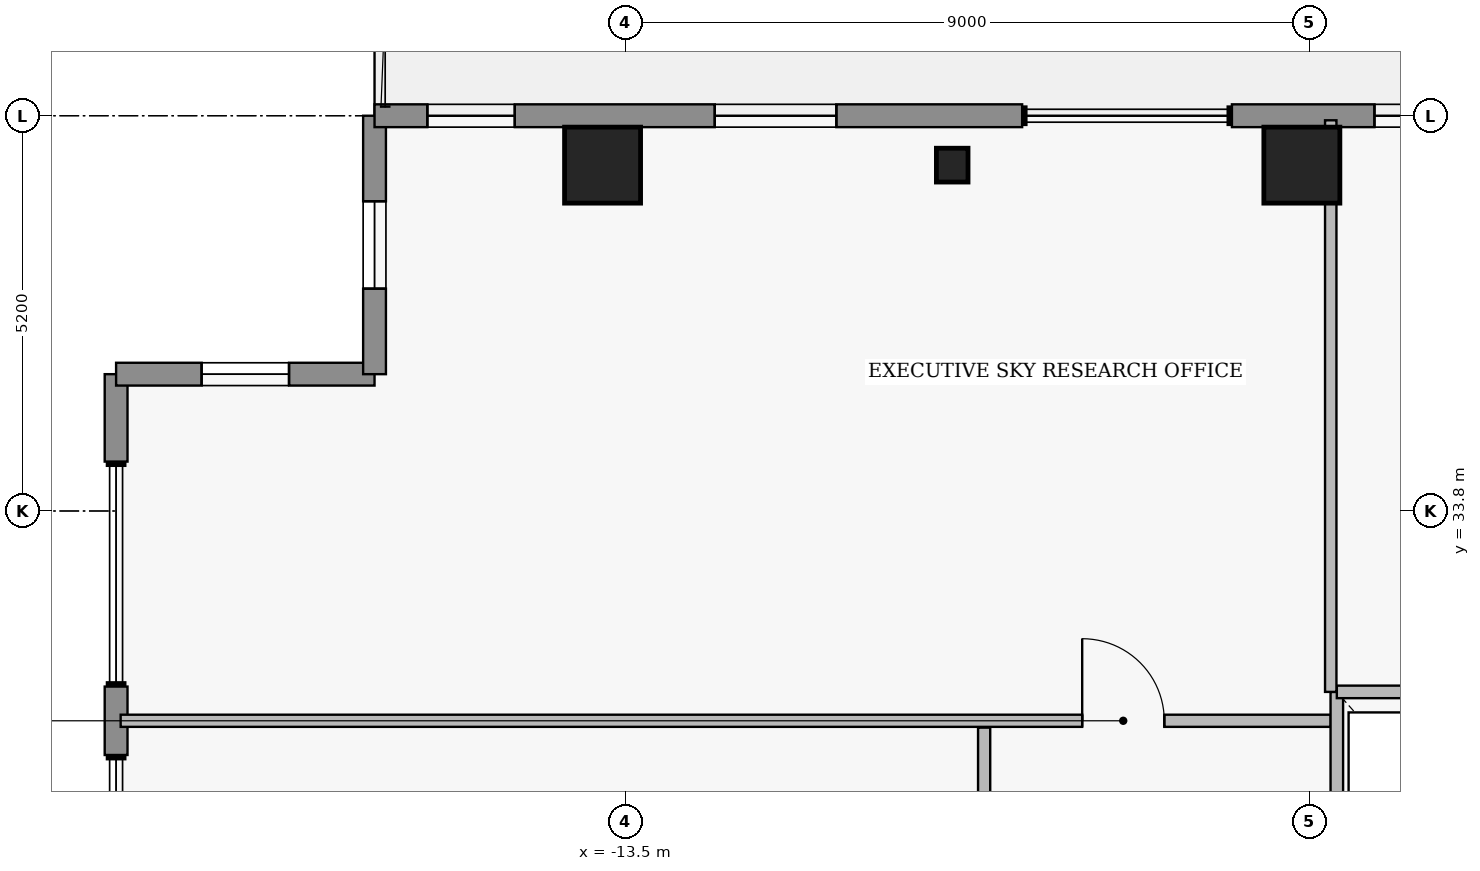
"""IFC4 building model, lengths in metres.
Left out: names, types, materials, properties, quantities, classifications, styles, units other than length and angle.
Written with IfcOpenShell. Run it as: python <this file> out.ifc"""

import sys

from ifc_helpers import new_model, si_unit, direction, frame, frame_2d, origin, origin_2d, place, context, subcontext, project, spatial, rectangle, i_section, extrude, element, fill, save


model = new_model("IFC4")
c1 = context("Model", 3, precision=1e-05, world=origin(), true_north=direction((0.0, 1.0)))
c2 = subcontext(c1, "Body", "Model", "MODEL_VIEW")
j1 = project(units=[si_unit("LENGTHUNIT", "METRE"), si_unit("PLANEANGLEUNIT", "RADIAN")], contexts=[c1])
p1 = place(None, origin())
s1 = spatial("IfcSite", under=j1, at=p1, CompositionType="ELEMENT")
p2 = place(p1, origin())
s2 = spatial("IfcBuilding", under=s1, at=p2, CompositionType="ELEMENT")
p3 = place(p2, frame((0.0, 0.0, 292.85)))
s3 = spatial("IfcBuildingStorey", under=s2, at=p3, CompositionType="ELEMENT", Elevation=292.85)
for number, where, z_axis, x_axis in (
    (1, (-13.8, 38.35, 0.0), (0.0, 0.0, 1.0), (1.0, 0.0, 0.0)),
    (2, (-4.6, 38.35, 0.0), (0.0, 0.0, 1.0), (1.0, 0.0, 0.0)),
):
    element("IfcColumn", number, at=place(p3, frame(where, z_axis=z_axis, x_axis=x_axis)), inside=s3, PredefinedType="COLUMN", context=c2, shape_type="SweptSolid", body=[
        extrude(rectangle(XDim=1.0, YDim=1.0, at=origin_2d()), origin(), (0.0, 0.0, 1.0), 4.4),
    ])
p4 = place(p3, frame((-9.2, 38.35, -0.22), z_axis=(0.0, 0.0, 1.0), x_axis=(1.0, 0.0, 0.0)))
e3 = element("IfcColumn", 3, at=p4, inside=s3, PredefinedType="PILASTER", context=c2, shape_type="SweptSolid", body=[
    extrude(i_section(OverallWidth=0.416, OverallDepth=0.445, WebThickness=0.039, FlangeThickness=0.063, at=origin_2d()), origin(), (0.0, 0.0, 1.0), 3.48),
])
p5 = place(p3, frame((-20.2, 30.59, 0.0), z_axis=(0.0, 0.0, 1.0), x_axis=(0.0, 1.0, 0.0)))
e4 = element("IfcWall", 4, at=p5, inside=s3, PredefinedType="STANDARD", context=c2, shape_type="SweptSolid", body=[
    extrude(rectangle(XDim=0.9, YDim=0.3, at=frame_2d((0.45, 0.0))), origin(), (0.0, 0.0, 1.0), 4.16),
])
p6 = place(p3, frame((-20.2, 34.45, 0.0), z_axis=(0.0, 0.0, 1.0), x_axis=(0.0, 1.0, 0.0)))
e5 = element("IfcWall", 5, at=p6, inside=s3, PredefinedType="STANDARD", context=c2, shape_type="SweptSolid", body=[
    extrude(rectangle(XDim=1.15, YDim=0.3, at=frame_2d((0.575, 0.0))), origin(), (0.0, 0.0, 1.0), 4.16),
])
p7 = place(p3, frame((-20.2, 35.6, 0.0), z_axis=(0.0, 0.0, 1.0), x_axis=(1.0, 0.0, 0.0)))
e6 = element("IfcWall", 6, at=p7, inside=s3, PredefinedType="STANDARD", context=c2, shape_type="SweptSolid", body=[
    extrude(rectangle(XDim=3.4, YDim=0.3, at=frame_2d((1.7, 0.0))), origin(), (0.0, 0.0, 1.0), 4.16),
])
p8 = place(p7, frame((1.125, 0.0, 1.25)))
e7 = element("IfcOpeningElement", 7, at=p8, cuts=e6, PredefinedType="OPENING", context=c2, shape_type="SweptSolid", body=[
    extrude(rectangle(XDim=1.15, YDim=1.55, at=frame_2d((0.575, 0.775))), frame((0.0, 0.16, 0.0), z_axis=(0.0, -1.0, 0.0), x_axis=(1.0, 0.0, 0.0)), (0.0, 0.0, 1.0), 0.32),
])
p9 = place(p3, frame((-16.8, 35.6, 0.0), z_axis=(0.0, 0.0, 1.0), x_axis=(0.0, 1.0, 0.0)))
e8 = element("IfcWall", 8, at=p9, inside=s3, PredefinedType="STANDARD", context=c2, shape_type="SweptSolid", body=[
    extrude(rectangle(XDim=3.4, YDim=0.3, at=frame_2d((1.7, 0.0))), origin(), (0.0, 0.0, 1.0), 4.16),
])
p10 = place(p9, frame((1.125, 0.0, 1.25)))
e9 = element("IfcOpeningElement", 9, at=p10, cuts=e8, PredefinedType="OPENING", context=c2, shape_type="SweptSolid", body=[
    extrude(rectangle(XDim=1.15, YDim=1.55, at=frame_2d((0.575, 0.775))), frame((0.0, 0.16, 0.0), z_axis=(0.0, -1.0, 0.0), x_axis=(1.0, 0.0, 0.0)), (0.0, 0.0, 1.0), 0.32),
])
p11 = place(p3, frame((-16.8, 39.0, 0.0), z_axis=(0.0, 0.0, 1.0), x_axis=(1.0, 0.0, 0.0)))
e10 = element("IfcWall", 10, at=p11, inside=s3, PredefinedType="STANDARD", context=c2, shape_type="SweptSolid", body=[
    extrude(rectangle(XDim=8.52, YDim=0.3, at=frame_2d((4.26, 0.0))), origin(), (0.0, 0.0, 1.0), 4.16),
])
p12 = place(p11, frame((4.476, 0.0, 0.85)))
e11 = element("IfcOpeningElement", 11, at=p12, cuts=e10, PredefinedType="OPENING", context=c2, shape_type="SweptSolid", body=[
    extrude(rectangle(XDim=1.6, YDim=1.8, at=frame_2d((0.8, 0.9))), frame((0.0, 0.16, 0.0), z_axis=(0.0, -1.0, 0.0), x_axis=(1.0, 0.0, 0.0)), (0.0, 0.0, 1.0), 0.32),
])
p13 = place(p11, frame((0.695, 0.0, 0.95)))
e12 = element("IfcOpeningElement", 12, at=p13, cuts=e10, PredefinedType="OPENING", context=c2, shape_type="SweptSolid", body=[
    extrude(rectangle(XDim=1.15, YDim=1.55, at=frame_2d((0.575, 0.775))), frame((0.0, 0.16, 0.0), z_axis=(0.0, -1.0, 0.0), x_axis=(1.0, 0.0, 0.0)), (0.0, 0.0, 1.0), 0.32),
])
p14 = place(p3, frame((-5.52, 39.0, 0.0), z_axis=(0.0, 0.0, 1.0), x_axis=(1.0, 0.0, 0.0)))
e13 = element("IfcWall", 13, at=p14, inside=s3, PredefinedType="STANDARD", context=c2, shape_type="SweptSolid", body=[
    extrude(rectangle(XDim=6.44, YDim=0.3, at=frame_2d((3.22, 0.0))), origin(), (0.0, 0.0, 1.0), 4.16),
])
p15 = place(p14, frame((1.875, 0.0, 0.95)))
e14 = element("IfcOpeningElement", 14, at=p15, cuts=e13, PredefinedType="OPENING", context=c2, shape_type="SweptSolid", body=[
    extrude(rectangle(XDim=1.15, YDim=1.55, at=frame_2d((0.575, 0.775))), frame((0.0, 0.16, 0.0), z_axis=(0.0, -1.0, 0.0), x_axis=(1.0, 0.0, 0.0)), (0.0, 0.0, 1.0), 0.32),
])
p16 = place(p3, frame((-20.14, 31.04, 0.0), z_axis=(0.0, 0.0, 1.0), x_axis=(1.0, 0.0, 0.0)))
e15 = element("IfcWall", 15, at=p16, inside=s3, PredefinedType="PARTITIONING", context=c2, shape_type="SweptSolid", body=[
    extrude(rectangle(XDim=15.92, YDim=0.16, at=frame_2d((7.96, 0.0))), origin(), (0.0, 0.0, 1.0), 4.16),
])
p17 = place(p16, frame((12.65, 0.0, 0.0)))
e16 = element("IfcOpeningElement", 16, at=p17, cuts=e15, PredefinedType="OPENING", context=c2, shape_type="SweptSolid", body=[
    extrude(rectangle(XDim=1.08, YDim=2.18, at=frame_2d((0.54, 1.09))), frame((0.0, 0.09, 0.0), z_axis=(0.0, -1.0, 0.0), x_axis=(1.0, 0.0, 0.0)), (0.0, 0.0, 1.0), 0.18),
])
p18 = place(p3, frame((-8.78, 23.76, 0.0), z_axis=(0.0, 0.0, 1.0), x_axis=(0.0, 1.0, 0.0)))
e17 = element("IfcWall", 17, at=p18, inside=s3, PredefinedType="PARTITIONING", context=c2, shape_type="SweptSolid", body=[
    extrude(rectangle(XDim=7.19, YDim=0.16, at=frame_2d((3.595, 0.0))), origin(), (0.0, 0.0, 1.0), 4.16),
])
p19 = place(p18, frame((3.055, 0.0, 0.0)))
e18 = element("IfcOpeningElement", 18, at=p19, cuts=e17, PredefinedType="OPENING", context=c2, shape_type="SweptSolid", body=[
    extrude(rectangle(XDim=1.08, YDim=2.18, at=frame_2d((0.54, 1.09))), frame((0.0, 0.09, 0.0), z_axis=(0.0, -1.0, 0.0), x_axis=(1.0, 0.0, 0.0)), (0.0, 0.0, 1.0), 0.18),
])
p20 = place(p3, frame((-4.14, 29.32, 0.0), z_axis=(0.0, 0.0, 1.0), x_axis=(0.0, 1.0, 0.0)))
e19 = element("IfcWall", 19, at=p20, inside=s3, PredefinedType="PARTITIONING", context=c2, shape_type="SweptSolid", body=[
    extrude(rectangle(XDim=2.1, YDim=0.165, at=frame_2d((1.05, 0.0))), origin(), (0.0, 0.0, 1.0), 1.76),
])
p21 = place(p3, frame((-4.14, 31.42, 0.0), z_axis=(0.0, 0.0, 1.0), x_axis=(1.0, 0.0, 0.0)))
e20 = element("IfcWall", 20, at=p21, inside=s3, PredefinedType="PARTITIONING", context=c2, shape_type="SweptSolid", body=[
    extrude(rectangle(XDim=1.86, YDim=0.165, at=frame_2d((0.93, 0.0))), origin(), (0.0, 0.0, 1.0), 4.16),
])
p22 = place(p3, frame((-4.22, 31.42, 0.0), z_axis=(0.0, 0.0, 1.0), x_axis=(0.0, 1.0, 0.0)))
e21 = element("IfcWall", 21, at=p22, inside=s3, PredefinedType="PARTITIONING", context=c2, shape_type="SweptSolid", body=[
    extrude(rectangle(XDim=7.52, YDim=0.15, at=frame_2d((3.76, 0.0))), origin(), (0.0, 0.0, 1.0), 1.76),
])
p23 = place(p8, origin())
e22 = element("IfcWindow", 22, at=p23, inside=s3, PartitioningType="SINGLE_PANEL", PredefinedType="WINDOW", context=c2, shape_type="SweptSolid", body=[
    extrude(rectangle(XDim=1.15, YDim=1.55, at=frame_2d((0.575, 0.775))), frame((0.0, 0.03, 0.0), z_axis=(0.0, -1.0, 0.0), x_axis=(1.0, 0.0, 0.0)), (0.0, 0.0, 1.0), 0.06),
])
fill(e7, e22)
p24 = place(p10, origin())
e23 = element("IfcWindow", 23, at=p24, inside=s3, PartitioningType="SINGLE_PANEL", PredefinedType="WINDOW", context=c2, shape_type="SweptSolid", body=[
    extrude(rectangle(XDim=1.15, YDim=1.55, at=frame_2d((0.575, 0.775))), frame((0.0, 0.03, 0.0), z_axis=(0.0, -1.0, 0.0), x_axis=(1.0, 0.0, 0.0)), (0.0, 0.0, 1.0), 0.06),
])
fill(e9, e23)
p25 = place(p12, origin())
e24 = element("IfcWindow", 24, at=p25, inside=s3, PartitioningType="SINGLE_PANEL", PredefinedType="WINDOW", context=c2, shape_type="SweptSolid", body=[
    extrude(rectangle(XDim=1.6, YDim=1.8, at=frame_2d((0.8, 0.9))), frame((0.0, 0.03, 0.0), z_axis=(0.0, -1.0, 0.0), x_axis=(1.0, 0.0, 0.0)), (0.0, 0.0, 1.0), 0.06),
])
fill(e11, e24)
p26 = place(p13, origin())
e25 = element("IfcWindow", 25, at=p26, inside=s3, PartitioningType="SINGLE_PANEL", PredefinedType="WINDOW", context=c2, shape_type="SweptSolid", body=[
    extrude(rectangle(XDim=1.15, YDim=1.55, at=frame_2d((0.575, 0.775))), frame((0.0, 0.03, 0.0), z_axis=(0.0, -1.0, 0.0), x_axis=(1.0, 0.0, 0.0)), (0.0, 0.0, 1.0), 0.06),
])
fill(e12, e25)
p27 = place(p15, origin())
e26 = element("IfcWindow", 26, at=p27, inside=s3, PartitioningType="SINGLE_PANEL", PredefinedType="WINDOW", context=c2, shape_type="SweptSolid", body=[
    extrude(rectangle(XDim=1.15, YDim=1.55, at=frame_2d((0.575, 0.775))), frame((0.0, 0.03, 0.0), z_axis=(0.0, -1.0, 0.0), x_axis=(1.0, 0.0, 0.0)), (0.0, 0.0, 1.0), 0.06),
])
fill(e14, e26)
p28 = place(p17, origin())
e27 = element("IfcDoor", 27, at=p28, inside=s3, OperationType="SINGLE_SWING_LEFT", PredefinedType="DOOR", context=c2, shape_type="SweptSolid", body=[
    extrude(rectangle(XDim=1.08, YDim=2.18, at=frame_2d((0.54, 1.09))), frame((0.0, 0.025, 0.0), z_axis=(0.0, -1.0, 0.0), x_axis=(1.0, 0.0, 0.0)), (0.0, 0.0, 1.0), 0.05),
])
fill(e16, e27)
save(model, sys.argv[1])
